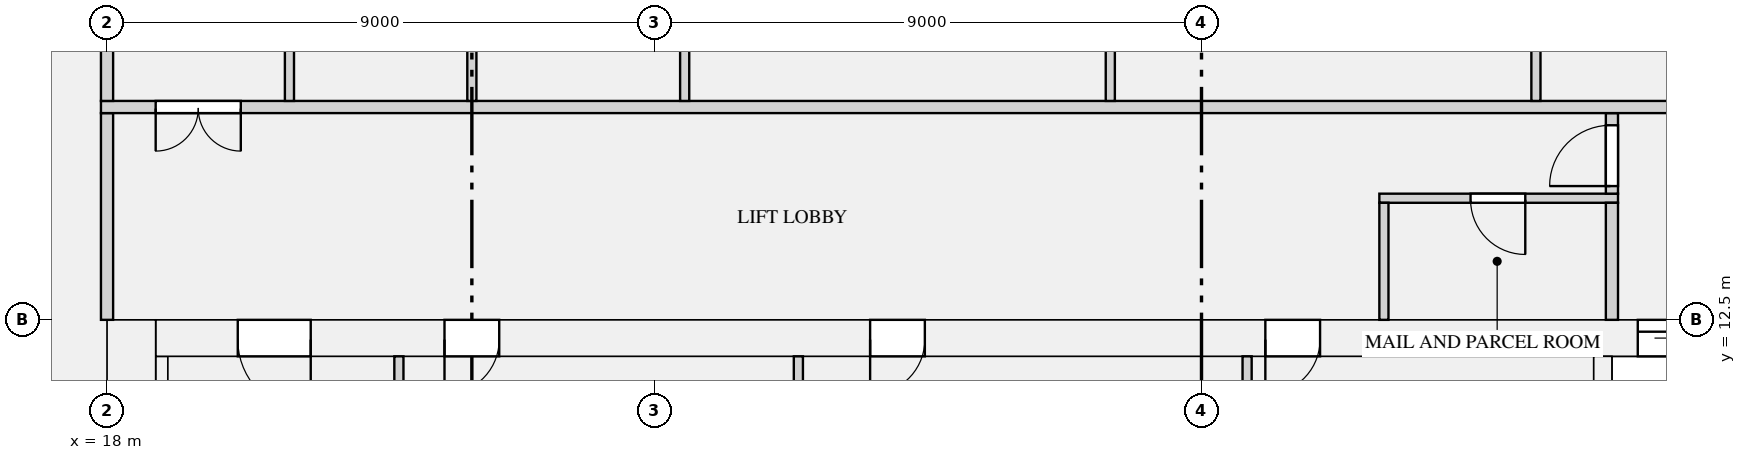
"""IFC4 building model, lengths in metres.
Left out: names, types, materials, properties, quantities, classifications, styles, units other than length and angle.
Written with IfcOpenShell. Run it as: python <this file> out.ifc"""

import sys

from ifc_helpers import new_model, si_unit, direction, frame, frame_2d, origin, place, context, subcontext, project, spatial, rectangle, extrude, element, fill, save


model = new_model("IFC4")
c1 = context("Model", 3, precision=1e-05, world=origin(), true_north=direction((0.0, 1.0)))
c2 = subcontext(c1, "Body", "Model", "MODEL_VIEW")
j1 = project(units=[si_unit("LENGTHUNIT", "METRE"), si_unit("PLANEANGLEUNIT", "RADIAN")], contexts=[c1])
p1 = place(None, origin())
s1 = spatial("IfcSite", under=j1, at=p1, CompositionType="ELEMENT")
p2 = place(p1, origin())
s2 = spatial("IfcBuilding", under=s1, at=p2, CompositionType="ELEMENT")
p3 = place(p2, frame((0.0, 0.0, 124.5)))
s3 = spatial("IfcBuildingStorey", under=s2, at=p3, CompositionType="ELEMENT", Elevation=124.5)
p4 = place(p3, frame((18.4, 0.0, 0.0), z_axis=(0.0, 0.0, 1.0), x_axis=(0.0, 1.0, 0.0)))
e1 = element("IfcWall", 1, at=p4, inside=s3, PredefinedType="SHEAR", context=c2, shape_type="SweptSolid", body=[
    extrude(rectangle(XDim=12.5, YDim=0.8, at=frame_2d((6.25, 0.0))), origin(), (0.0, 0.0, 1.0), 3.15),
])
p5 = place(p3, frame((18.8, 12.2, 0.0), z_axis=(0.0, 0.0, 1.0), x_axis=(1.0, 0.0, 0.0)))
e2 = element("IfcWall", 2, at=p5, inside=s3, PredefinedType="SHEAR", context=c2, shape_type="SweptSolid", body=[
    extrude(rectangle(XDim=34.4, YDim=0.6, at=frame_2d((17.2, 0.0))), origin(), (0.0, 0.0, 1.0), 3.15),
])
p6 = place(p5, frame((24.375, 0.0, 0.0)))
e3 = element("IfcOpeningElement", 3, at=p6, cuts=e2, PredefinedType="OPENING", context=c2, shape_type="SweptSolid", body=[
    extrude(rectangle(XDim=1.1, YDim=2.1, at=frame_2d((0.55, 1.05))), frame((0.0, 0.31, 0.0), z_axis=(0.0, -1.0, 0.0), x_axis=(1.0, 0.0, 0.0)), (0.0, 0.0, 1.0), 0.62),
])
p7 = place(p5, frame((26.625, 0.0, 0.0)))
e4 = element("IfcOpeningElement", 4, at=p7, cuts=e2, PredefinedType="OPENING", context=c2, shape_type="SweptSolid", body=[
    extrude(rectangle(XDim=1.1, YDim=2.1, at=frame_2d((0.55, 1.05))), frame((0.0, 0.31, 0.0), z_axis=(0.0, -1.0, 0.0), x_axis=(1.0, 0.0, 0.0)), (0.0, 0.0, 1.0), 0.62),
])
p8 = place(p5, frame((28.875, 0.0, 0.0)))
e5 = element("IfcOpeningElement", 5, at=p8, cuts=e2, PredefinedType="OPENING", context=c2, shape_type="SweptSolid", body=[
    extrude(rectangle(XDim=1.1, YDim=2.1, at=frame_2d((0.55, 1.05))), frame((0.0, 0.31, 0.0), z_axis=(0.0, -1.0, 0.0), x_axis=(1.0, 0.0, 0.0)), (0.0, 0.0, 1.0), 0.62),
])
p9 = place(p5, frame((4.75, 0.0, 0.0)))
e6 = element("IfcOpeningElement", 6, at=p9, cuts=e2, PredefinedType="OPENING", context=c2, shape_type="SweptSolid", body=[
    extrude(rectangle(XDim=0.9, YDim=2.1, at=frame_2d((0.45, 1.05))), frame((0.0, 0.31, 0.0), z_axis=(0.0, -1.0, 0.0), x_axis=(1.0, 0.0, 0.0)), (0.0, 0.0, 1.0), 0.62),
])
p10 = place(p5, frame((11.75, 0.0, 0.0)))
e7 = element("IfcOpeningElement", 7, at=p10, cuts=e2, PredefinedType="OPENING", context=c2, shape_type="SweptSolid", body=[
    extrude(rectangle(XDim=0.9, YDim=2.1, at=frame_2d((0.45, 1.05))), frame((0.0, 0.31, 0.0), z_axis=(0.0, -1.0, 0.0), x_axis=(1.0, 0.0, 0.0)), (0.0, 0.0, 1.0), 0.62),
])
p11 = place(p5, frame((18.25, 0.0, 0.0)))
e8 = element("IfcOpeningElement", 8, at=p11, cuts=e2, PredefinedType="OPENING", context=c2, shape_type="SweptSolid", body=[
    extrude(rectangle(XDim=0.9, YDim=2.1, at=frame_2d((0.45, 1.05))), frame((0.0, 0.31, 0.0), z_axis=(0.0, -1.0, 0.0), x_axis=(1.0, 0.0, 0.0)), (0.0, 0.0, 1.0), 0.62),
])
p12 = place(p5, frame((1.35, 0.0, 0.0)))
e9 = element("IfcOpeningElement", 9, at=p12, cuts=e2, PredefinedType="OPENING", context=c2, shape_type="SweptSolid", body=[
    extrude(rectangle(XDim=1.2, YDim=2.1, at=frame_2d((0.6, 1.05))), frame((0.0, 0.31, 0.0), z_axis=(0.0, -1.0, 0.0), x_axis=(1.0, 0.0, 0.0)), (0.0, 0.0, 1.0), 0.62),
])
p13 = place(p5, frame((31.85, 0.0, 0.0)))
e10 = element("IfcOpeningElement", 10, at=p13, cuts=e2, PredefinedType="OPENING", context=c2, shape_type="SweptSolid", body=[
    extrude(rectangle(XDim=1.2, YDim=2.1, at=frame_2d((0.6, 1.05))), frame((0.0, 0.31, 0.0), z_axis=(0.0, -1.0, 0.0), x_axis=(1.0, 0.0, 0.0)), (0.0, 0.0, 1.0), 0.62),
])
p14 = place(p3, frame((18.9, 1.0, 0.0), z_axis=(0.0, 0.0, 1.0), x_axis=(0.0, 1.0, 0.0)))
e11 = element("IfcWall", 11, at=p14, inside=s3, PredefinedType="SHEAR", context=c2, shape_type="SweptSolid", body=[
    extrude(rectangle(XDim=10.9, YDim=0.2, at=frame_2d((5.45, 0.0))), origin(), (0.0, 0.0, 1.0), 3.15),
])
p15 = place(p3, frame((42.6, 8.25, 0.0), z_axis=(0.0, 0.0, 1.0), x_axis=(0.0, 1.0, 0.0)))
e12 = element("IfcWall", 12, at=p15, inside=s3, PredefinedType="SHEAR", context=c2, shape_type="SweptSolid", body=[
    extrude(rectangle(XDim=3.65, YDim=0.3, at=frame_2d((1.825, 0.0))), origin(), (0.0, 0.0, 1.0), 3.15),
])
p16 = place(p3, frame((38.925, 14.5, 0.0), z_axis=(0.0, 0.0, 1.0), x_axis=(1.0, 0.0, 0.0)))
e13 = element("IfcWall", 13, at=p16, inside=s3, PredefinedType="PARTITIONING", context=c2, shape_type="SweptSolid", body=[
    extrude(rectangle(XDim=3.925, YDim=0.15, at=frame_2d((1.962, 0.0))), origin(), (0.0, 0.0, 1.0), 2.83),
])
p17 = place(p16, frame((1.5, 0.0, 0.0)))
e14 = element("IfcOpeningElement", 14, at=p17, cuts=e13, PredefinedType="OPENING", context=c2, shape_type="SweptSolid", body=[
    extrude(rectangle(XDim=0.9, YDim=2.1, at=frame_2d((0.45, 1.05))), frame((0.0, 0.085, 0.0), z_axis=(0.0, -1.0, 0.0), x_axis=(1.0, 0.0, 0.0)), (0.0, 0.0, 1.0), 0.17),
])
for number, where, z_axis, x_axis in (
    (15, (22.8, 9.505, 0.0), (0.0, 0.0, 1.0), (0.0, 1.0, 0.0)),
    (16, (29.37, 9.505, 0.0), (0.0, 0.0, 1.0), (0.0, 1.0, 0.0)),
    (17, (36.75, 9.505, 0.0), (0.0, 0.0, 1.0), (0.0, 1.0, 0.0)),
):
    element("IfcWall", number, at=place(p3, frame(where, z_axis=z_axis, x_axis=x_axis)), inside=s3, PredefinedType="PARTITIONING", context=c2, shape_type="SweptSolid", body=[
        extrude(rectangle(XDim=2.395, YDim=0.15, at=frame_2d((1.198, 0.0))), origin(), (0.0, 0.0, 1.0), 2.83),
    ])
p18 = place(p3, frame((18.0, 12.5, 0.0), z_axis=(0.0, 0.0, 1.0), x_axis=(0.0, 1.0, 0.0)))
e18 = element("IfcWall", 18, at=p18, inside=s3, PredefinedType="PARTITIONING", context=c2, shape_type="SweptSolid", body=[
    extrude(rectangle(XDim=3.4, YDim=0.2, at=frame_2d((1.7, 0.0))), origin(), (0.0, 0.0, 1.0), 2.83),
])
p19 = place(p3, frame((39.0, 12.5, 0.0), z_axis=(0.0, 0.0, 1.0), x_axis=(0.0, 1.0, 0.0)))
e19 = element("IfcWall", 19, at=p19, inside=s3, PredefinedType="PARTITIONING", context=c2, shape_type="SweptSolid", body=[
    extrude(rectangle(XDim=1.925, YDim=0.15, at=frame_2d((0.962, 0.0))), origin(), (0.0, 0.0, 1.0), 2.83),
])
p20 = place(p3, frame((42.75, 12.5, 0.0), z_axis=(0.0, 0.0, 1.0), x_axis=(0.0, 1.0, 0.0)))
e20 = element("IfcWall", 20, at=p20, inside=s3, PredefinedType="PARTITIONING", context=c2, shape_type="SweptSolid", body=[
    extrude(rectangle(XDim=1.925, YDim=0.2, at=frame_2d((0.962, 0.0))), origin(), (0.0, 0.0, 1.0), 2.83),
])
p21 = place(p3, frame((42.75, 14.575, 0.0), z_axis=(0.0, 0.0, 1.0), x_axis=(0.0, 1.0, 0.0)))
e21 = element("IfcWall", 21, at=p21, inside=s3, PredefinedType="PARTITIONING", context=c2, shape_type="SweptSolid", body=[
    extrude(rectangle(XDim=1.325, YDim=0.2, at=frame_2d((0.663, 0.0))), origin(), (0.0, 0.0, 1.0), 2.83),
])
p22 = place(p21, frame((0.125, 0.0, 0.0)))
e22 = element("IfcOpeningElement", 22, at=p22, cuts=e21, PredefinedType="OPENING", context=c2, shape_type="SweptSolid", body=[
    extrude(rectangle(XDim=1.0, YDim=2.1, at=frame_2d((0.5, 1.05))), frame((0.0, 0.11, 0.0), z_axis=(0.0, -1.0, 0.0), x_axis=(1.0, 0.0, 0.0)), (0.0, 0.0, 1.0), 0.22),
])
p23 = place(p3, frame((17.9, 16.0, 0.0), z_axis=(0.0, 0.0, 1.0), x_axis=(1.0, 0.0, 0.0)))
e23 = element("IfcWall", 23, at=p23, inside=s3, PredefinedType="PARTITIONING", context=c2, shape_type="SweptSolid", body=[
    extrude(rectangle(XDim=36.2, YDim=0.2, at=frame_2d((18.1, 0.0))), origin(), (0.0, 0.0, 1.0), 2.83),
])
p24 = place(p23, frame((0.9, 0.0, 0.0)))
e24 = element("IfcOpeningElement", 24, at=p24, cuts=e23, PredefinedType="OPENING", context=c2, shape_type="SweptSolid", body=[
    extrude(rectangle(XDim=1.4, YDim=2.1, at=frame_2d((0.7, 1.05))), frame((0.0, 0.11, 0.0), z_axis=(0.0, -1.0, 0.0), x_axis=(1.0, 0.0, 0.0)), (0.0, 0.0, 1.0), 0.22),
])
p25 = place(p23, frame((33.9, 0.0, 0.0)))
e25 = element("IfcOpeningElement", 25, at=p25, cuts=e23, PredefinedType="OPENING", context=c2, shape_type="SweptSolid", body=[
    extrude(rectangle(XDim=1.4, YDim=2.1, at=frame_2d((0.7, 1.05))), frame((0.0, 0.11, 0.0), z_axis=(0.0, -1.0, 0.0), x_axis=(1.0, 0.0, 0.0)), (0.0, 0.0, 1.0), 0.22),
])
p26 = place(p3, frame((18.0, 16.1, 0.0), z_axis=(0.0, 0.0, 1.0), x_axis=(0.0, 1.0, 0.0)))
e26 = element("IfcWall", 26, at=p26, inside=s3, PredefinedType="PARTITIONING", context=c2, shape_type="SweptSolid", body=[
    extrude(rectangle(XDim=7.8, YDim=0.2, at=frame_2d((3.9, 0.0))), origin(), (0.0, 0.0, 1.0), 2.83),
])
p27 = place(p26, frame((2.35, 0.0, 0.0)))
e27 = element("IfcOpeningElement", 27, at=p27, cuts=e26, PredefinedType="OPENING", context=c2, shape_type="SweptSolid", body=[
    extrude(rectangle(XDim=1.1, YDim=2.1, at=frame_2d((0.55, 1.05))), frame((0.0, 0.11, 0.0), z_axis=(0.0, -1.0, 0.0), x_axis=(1.0, 0.0, 0.0)), (0.0, 0.0, 1.0), 0.22),
])
p28 = place(p3, frame((21.0, 16.1, 0.0), z_axis=(0.0, 0.0, 1.0), x_axis=(0.0, 1.0, 0.0)))
e28 = element("IfcWall", 28, at=p28, inside=s3, PredefinedType="PARTITIONING", context=c2, shape_type="SweptSolid", body=[
    extrude(rectangle(XDim=4.825, YDim=0.15, at=frame_2d((2.413, 0.0))), origin(), (0.0, 0.0, 1.0), 2.83),
])
p29 = place(p28, frame((1.95, 0.0, 0.0)))
e29 = element("IfcOpeningElement", 29, at=p29, cuts=e28, PredefinedType="OPENING", context=c2, shape_type="SweptSolid", body=[
    extrude(rectangle(XDim=0.9, YDim=2.1, at=frame_2d((0.45, 1.05))), frame((0.0, 0.085, 0.0), z_axis=(0.0, -1.0, 0.0), x_axis=(1.0, 0.0, 0.0)), (0.0, 0.0, 1.0), 0.17),
])
for number, where, z_axis, x_axis in (
    (30, (24.0, 16.1, 0.0), (0.0, 0.0, 1.0), (0.0, 1.0, 0.0)),
    (31, (27.5, 16.1, 0.0), (0.0, 0.0, 1.0), (0.0, 1.0, 0.0)),
    (32, (34.5, 16.1, 0.0), (0.0, 0.0, 1.0), (0.0, 1.0, 0.0)),
    (33, (41.5, 16.1, 0.0), (0.0, 0.0, 1.0), (0.0, 1.0, 0.0)),
):
    element("IfcWall", number, at=place(p3, frame(where, z_axis=z_axis, x_axis=x_axis)), inside=s3, PredefinedType="PARTITIONING", context=c2, shape_type="SweptSolid", body=[
        extrude(rectangle(XDim=4.825, YDim=0.15, at=frame_2d((2.413, 0.0))), origin(), (0.0, 0.0, 1.0), 2.83),
    ])
p30 = place(p6, origin())
e34 = element("IfcDoor", 34, at=p30, inside=s3, OperationType="DOUBLE_DOOR_SLIDING", PredefinedType="DOOR", context=c2, shape_type="SweptSolid", body=[
    extrude(rectangle(XDim=1.1, YDim=2.1, at=frame_2d((0.55, 1.05))), frame((0.0, 0.025, 0.0), z_axis=(0.0, -1.0, 0.0), x_axis=(1.0, 0.0, 0.0)), (0.0, 0.0, 1.0), 0.05),
])
fill(e3, e34)
p31 = place(p17, frame((0.9, 0.0, 0.0), z_axis=(0.0, 0.0, 1.0), x_axis=(-1.0, 0.0, 0.0)))
e35 = element("IfcDoor", 35, at=p31, inside=s3, OperationType="SINGLE_SWING_LEFT", PredefinedType="DOOR", context=c2, shape_type="SweptSolid", body=[
    extrude(rectangle(XDim=0.9, YDim=2.1, at=frame_2d((0.45, 1.05))), frame((0.0, 0.025, 0.0), z_axis=(0.0, -1.0, 0.0), x_axis=(1.0, 0.0, 0.0)), (0.0, 0.0, 1.0), 0.05),
])
fill(e14, e35)
p32 = place(p9, frame((0.9, 0.0, 0.0), z_axis=(0.0, 0.0, 1.0), x_axis=(-1.0, 0.0, 0.0)))
e36 = element("IfcDoor", 36, at=p32, inside=s3, OperationType="SINGLE_SWING_RIGHT", PredefinedType="DOOR", context=c2, shape_type="SweptSolid", body=[
    extrude(rectangle(XDim=0.9, YDim=2.1, at=frame_2d((0.45, 1.05))), frame((0.0, 0.025, 0.0), z_axis=(0.0, -1.0, 0.0), x_axis=(1.0, 0.0, 0.0)), (0.0, 0.0, 1.0), 0.05),
])
fill(e6, e36)
p33 = place(p10, frame((0.9, 0.0, 0.0), z_axis=(0.0, 0.0, 1.0), x_axis=(-1.0, 0.0, 0.0)))
e37 = element("IfcDoor", 37, at=p33, inside=s3, OperationType="SINGLE_SWING_RIGHT", PredefinedType="DOOR", context=c2, shape_type="SweptSolid", body=[
    extrude(rectangle(XDim=0.9, YDim=2.1, at=frame_2d((0.45, 1.05))), frame((0.0, 0.025, 0.0), z_axis=(0.0, -1.0, 0.0), x_axis=(1.0, 0.0, 0.0)), (0.0, 0.0, 1.0), 0.05),
])
fill(e7, e37)
p34 = place(p11, frame((0.9, 0.0, 0.0), z_axis=(0.0, 0.0, 1.0), x_axis=(-1.0, 0.0, 0.0)))
e38 = element("IfcDoor", 38, at=p34, inside=s3, OperationType="SINGLE_SWING_RIGHT", PredefinedType="DOOR", context=c2, shape_type="SweptSolid", body=[
    extrude(rectangle(XDim=0.9, YDim=2.1, at=frame_2d((0.45, 1.05))), frame((0.0, 0.025, 0.0), z_axis=(0.0, -1.0, 0.0), x_axis=(1.0, 0.0, 0.0)), (0.0, 0.0, 1.0), 0.05),
])
fill(e8, e38)
p35 = place(p12, frame((1.2, 0.0, 0.0), z_axis=(0.0, 0.0, 1.0), x_axis=(-1.0, 0.0, 0.0)))
e39 = element("IfcDoor", 39, at=p35, inside=s3, OperationType="SINGLE_SWING_LEFT", PredefinedType="DOOR", context=c2, shape_type="SweptSolid", body=[
    extrude(rectangle(XDim=1.2, YDim=2.1, at=frame_2d((0.6, 1.05))), frame((0.0, 0.025, 0.0), z_axis=(0.0, -1.0, 0.0), x_axis=(1.0, 0.0, 0.0)), (0.0, 0.0, 1.0), 0.05),
])
fill(e9, e39)
p36 = place(p22, origin())
e40 = element("IfcDoor", 40, at=p36, inside=s3, OperationType="SINGLE_SWING_LEFT", PredefinedType="DOOR", context=c2, shape_type="SweptSolid", body=[
    extrude(rectangle(XDim=1.0, YDim=2.1, at=frame_2d((0.5, 1.05))), frame((0.0, 0.025, 0.0), z_axis=(0.0, -1.0, 0.0), x_axis=(1.0, 0.0, 0.0)), (0.0, 0.0, 1.0), 0.05),
])
fill(e22, e40)
p37 = place(p24, frame((1.4, 0.0, 0.0), z_axis=(0.0, 0.0, 1.0), x_axis=(-1.0, 0.0, 0.0)))
e41 = element("IfcDoor", 41, at=p37, inside=s3, OperationType="DOUBLE_DOOR_SINGLE_SWING", PredefinedType="DOOR", context=c2, shape_type="SweptSolid", body=[
    extrude(rectangle(XDim=1.4, YDim=2.1, at=frame_2d((0.7, 1.05))), frame((0.0, 0.025, 0.0), z_axis=(0.0, -1.0, 0.0), x_axis=(1.0, 0.0, 0.0)), (0.0, 0.0, 1.0), 0.05),
])
fill(e24, e41)
save(model, sys.argv[1])
